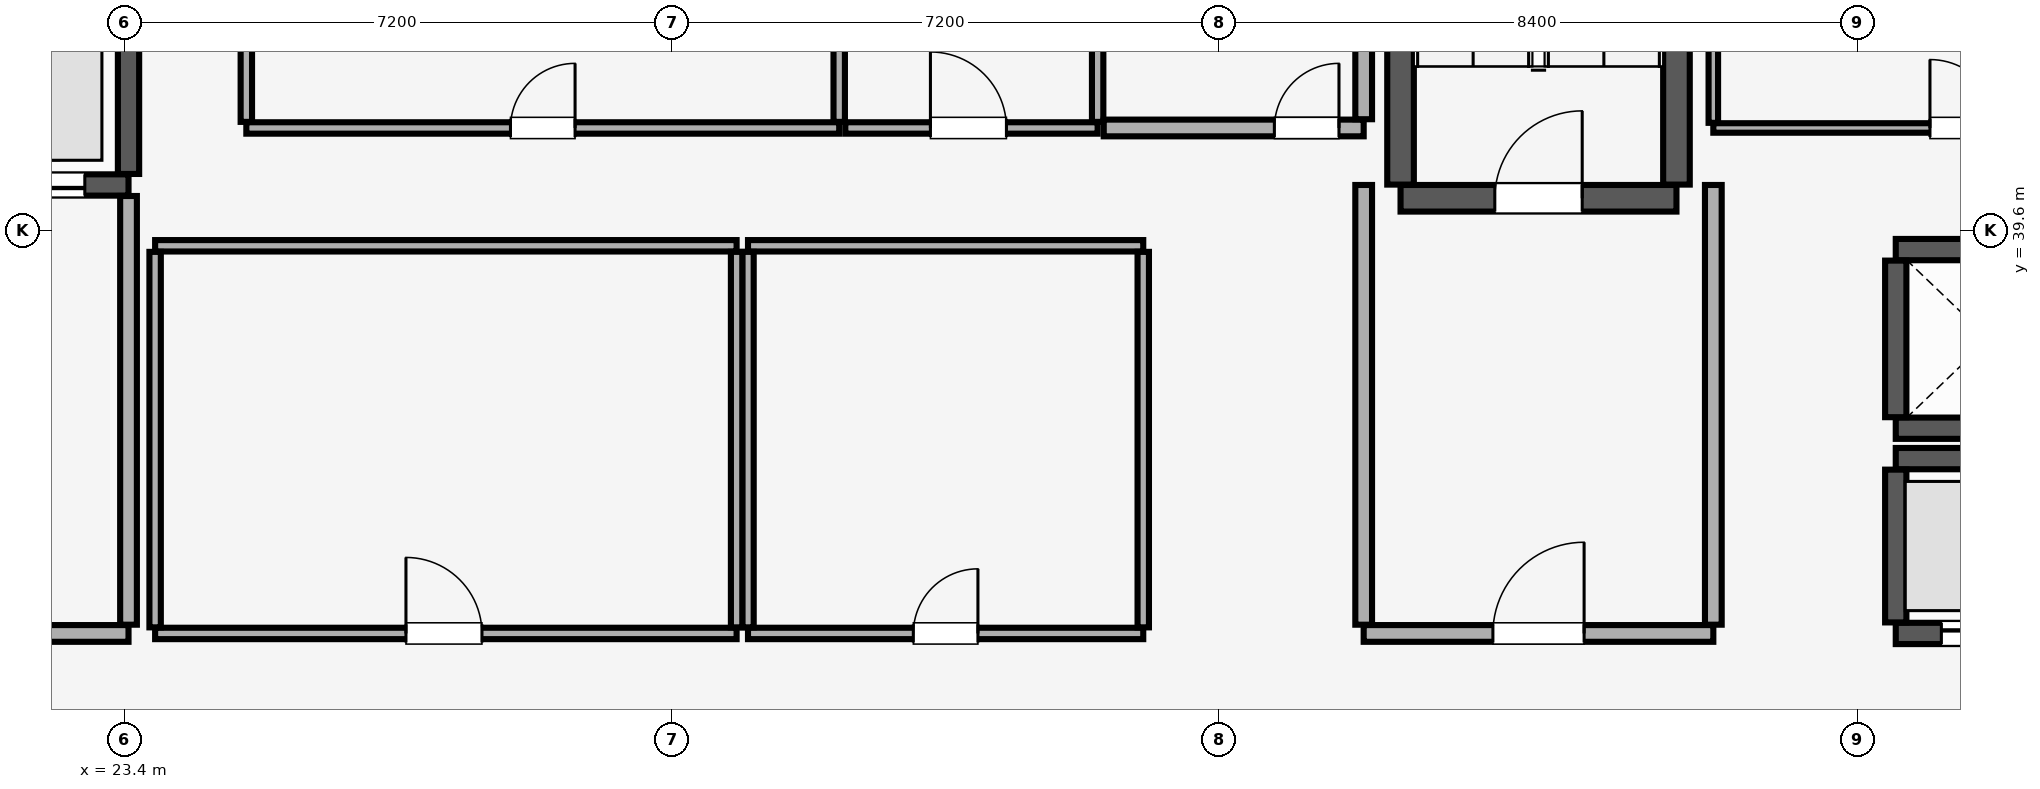
"""IFC4 building model, lengths in metres.
Left out: names, types, materials, properties, quantities, classifications, styles, units other than length and angle.
Written with IfcOpenShell. Run it as: python <this file> out.ifc"""

import sys

from ifc_helpers import new_model, si_unit, direction, frame, frame_2d, origin, place, context, subcontext, project, spatial, rectangle, extrude, element, fill, save


model = new_model("IFC4")
c1 = context("Model", 3, precision=1e-05, world=origin(), true_north=direction((0.0, 1.0)))
c2 = subcontext(c1, "Body", "Model", "MODEL_VIEW")
j1 = project(units=[si_unit("LENGTHUNIT", "METRE"), si_unit("PLANEANGLEUNIT", "RADIAN")], contexts=[c1])
p1 = place(None, origin())
s1 = spatial("IfcSite", under=j1, at=p1, CompositionType="ELEMENT")
p2 = place(p1, origin())
s2 = spatial("IfcBuilding", under=s1, at=p2, CompositionType="ELEMENT")
p3 = place(p2, frame((0.0, 0.0, 184.75)))
s3 = spatial("IfcBuildingStorey", under=s2, at=p3, CompositionType="ELEMENT", Elevation=184.75)
p4 = place(p3, frame((40.185, 40.025, 0.0), z_axis=(0.0, 0.0, 1.0), x_axis=(1.0, 0.0, 0.0)))
e1 = element("IfcWall", 1, at=p4, inside=s3, PredefinedType="SHEAR", context=c2, shape_type="SweptSolid", body=[
    extrude(rectangle(XDim=3.63, YDim=0.35, at=frame_2d((1.815, 0.0))), origin(), (0.0, 0.0, 1.0), 5.16),
])
p5 = place(p4, frame((1.24, 0.0, 0.0)))
e2 = element("IfcOpeningElement", 2, at=p5, cuts=e1, PredefinedType="OPENING", context=c2, shape_type="SweptSolid", body=[
    extrude(rectangle(XDim=1.15, YDim=2.15, at=frame_2d((0.575, 1.075))), frame((0.0, 0.185, 0.0), z_axis=(0.0, -1.0, 0.0), x_axis=(1.0, 0.0, 0.0)), (0.0, 0.0, 1.0), 0.37),
])
for number, where, z_axis, x_axis in (
    (3, (40.185, 40.205, 0.0), (0.0, 0.0, 1.0), (0.0, 1.0, 0.0)),
    (4, (43.815, 40.205, 0.0), (0.0, 0.0, 1.0), (0.0, 1.0, 0.0)),
):
    element("IfcWall", number, at=place(p3, frame(where, z_axis=z_axis, x_axis=x_axis)), inside=s3, PredefinedType="SHEAR", context=c2, shape_type="SweptSolid", body=[
        extrude(rectangle(XDim=8.09, YDim=0.35, at=frame_2d((4.045, 0.0))), origin(), (0.0, 0.0, 1.0), 5.16),
    ])
p6 = place(p3, frame((46.7, 34.3, 0.0), z_axis=(0.0, 0.0, 1.0), x_axis=(1.0, 0.0, 0.0)))
e5 = element("IfcWall", 5, at=p6, inside=s3, PredefinedType="SHEAR", context=c2, shape_type="SweptSolid", body=[
    extrude(rectangle(XDim=2.3, YDim=0.28, at=frame_2d((1.15, 0.0))), origin(), (0.0, 0.0, 1.0), 5.16),
])
p7 = place(p6, frame((0.6, 0.0, 0.0)))
e6 = element("IfcOpeningElement", 6, at=p7, cuts=e5, PredefinedType="OPENING", context=c2, shape_type="SweptSolid", body=[
    extrude(rectangle(XDim=1.1, YDim=2.2, at=frame_2d((0.55, 1.1))), frame((0.0, 0.15, 0.0), z_axis=(0.0, -1.0, 0.0), x_axis=(1.0, 0.0, 0.0)), (0.0, 0.0, 1.0), 0.3),
])
p8 = place(p3, frame((46.7, 36.6, 0.0), z_axis=(0.0, 0.0, 1.0), x_axis=(1.0, 0.0, 0.0)))
e7 = element("IfcWall", 7, at=p8, inside=s3, PredefinedType="SHEAR", context=c2, shape_type="SweptSolid", body=[
    extrude(rectangle(XDim=2.3, YDim=0.28, at=frame_2d((1.15, 0.0))), origin(), (0.0, 0.0, 1.0), 5.16),
])
p9 = place(p3, frame((46.7, 34.445, 0.0), z_axis=(0.0, 0.0, 1.0), x_axis=(0.0, 1.0, 0.0)))
e8 = element("IfcWall", 8, at=p9, inside=s3, PredefinedType="SHEAR", context=c2, shape_type="SweptSolid", body=[
    extrude(rectangle(XDim=2.01, YDim=0.28, at=frame_2d((1.005, 0.0))), origin(), (0.0, 0.0, 1.0), 5.16),
])
for number, where, z_axis, x_axis in (
    (9, (46.7, 37.0, 0.0), (0.0, 0.0, 1.0), (1.0, 0.0, 0.0)),
    (10, (46.7, 39.35, 0.0), (0.0, 0.0, 1.0), (1.0, 0.0, 0.0)),
):
    element("IfcWall", number, at=place(p3, frame(where, z_axis=z_axis, x_axis=x_axis)), inside=s3, PredefinedType="SHEAR", context=c2, shape_type="SweptSolid", body=[
        extrude(rectangle(XDim=2.45, YDim=0.28, at=frame_2d((1.225, 0.0))), origin(), (0.0, 0.0, 1.0), 5.16),
    ])
p10 = place(p3, frame((46.7, 37.145, 0.0), z_axis=(0.0, 0.0, 1.0), x_axis=(0.0, 1.0, 0.0)))
e11 = element("IfcWall", 11, at=p10, inside=s3, PredefinedType="SHEAR", context=c2, shape_type="SweptSolid", body=[
    extrude(rectangle(XDim=2.06, YDim=0.28, at=frame_2d((1.03, 0.0))), origin(), (0.0, 0.0, 1.0), 5.16),
])
p11 = place(p3, frame((21.035, 40.2, 0.0), z_axis=(0.0, 0.0, 1.0), x_axis=(1.0, 0.0, 0.0)))
e12 = element("IfcWall", 12, at=p11, inside=s3, PredefinedType="SHEAR", context=c2, shape_type="SweptSolid", body=[
    extrude(rectangle(XDim=2.415, YDim=0.28, at=frame_2d((1.208, 0.0))), origin(), (0.0, 0.0, 1.0), 5.16),
])
p12 = place(p11, frame((0.54, 0.0, 0.0)))
e13 = element("IfcOpeningElement", 13, at=p12, cuts=e12, PredefinedType="OPENING", context=c2, shape_type="SweptSolid", body=[
    extrude(rectangle(XDim=1.3, YDim=2.3, at=frame_2d((0.65, 1.15))), frame((0.0, 0.15, 0.0), z_axis=(0.0, -1.0, 0.0), x_axis=(1.0, 0.0, 0.0)), (0.0, 0.0, 1.0), 0.3),
])
p13 = place(p3, frame((23.45, 40.345, 0.0), z_axis=(0.0, 0.0, 1.0), x_axis=(0.0, 1.0, 0.0)))
e14 = element("IfcWall", 14, at=p13, inside=s3, PredefinedType="SHEAR", context=c2, shape_type="SweptSolid", body=[
    extrude(rectangle(XDim=2.81, YDim=0.28, at=frame_2d((1.405, 0.0))), origin(), (0.0, 0.0, 1.0), 5.16),
])
p14 = place(p3, frame((17.4, 34.3, 0.0), z_axis=(0.0, 0.0, 1.0), x_axis=(1.0, 0.0, 0.0)))
e15 = element("IfcWall", 15, at=p14, inside=s3, PredefinedType="PARTITIONING", context=c2, shape_type="SweptSolid", body=[
    extrude(rectangle(XDim=6.05, YDim=0.22, at=frame_2d((3.025, 0.0))), origin(), (0.0, 0.0, 1.0), 5.16),
])
p15 = place(p14, frame((2.2, 0.0, 0.0)))
e16 = element("IfcOpeningElement", 16, at=p15, cuts=e15, PredefinedType="OPENING", context=c2, shape_type="SweptSolid", body=[
    extrude(rectangle(XDim=1.2, YDim=2.15, at=frame_2d((0.6, 1.075))), frame((0.0, 0.12, 0.0), z_axis=(0.0, -1.0, 0.0), x_axis=(1.0, 0.0, 0.0)), (0.0, 0.0, 1.0), 0.24),
])
p16 = place(p3, frame((23.45, 34.415, 0.0), z_axis=(0.0, 0.0, 1.0), x_axis=(0.0, 1.0, 0.0)))
e17 = element("IfcWall", 17, at=p16, inside=s3, PredefinedType="PARTITIONING", context=c2, shape_type="SweptSolid", body=[
    extrude(rectangle(XDim=5.64, YDim=0.22, at=frame_2d((2.82, 0.0))), origin(), (0.0, 0.0, 1.0), 5.16),
])
p17 = place(p3, frame((39.7, 34.3, 0.0), z_axis=(0.0, 0.0, 1.0), x_axis=(1.0, 0.0, 0.0)))
e18 = element("IfcWall", 18, at=p17, inside=s3, PredefinedType="PARTITIONING", context=c2, shape_type="SweptSolid", body=[
    extrude(rectangle(XDim=4.6, YDim=0.22, at=frame_2d((2.3, 0.0))), origin(), (0.0, 0.0, 1.0), 5.16),
])
p18 = place(p17, frame((1.7, 0.0, 0.0)))
e19 = element("IfcOpeningElement", 19, at=p18, cuts=e18, PredefinedType="OPENING", context=c2, shape_type="SweptSolid", body=[
    extrude(rectangle(XDim=1.2, YDim=2.15, at=frame_2d((0.6, 1.075))), frame((0.0, 0.12, 0.0), z_axis=(0.0, -1.0, 0.0), x_axis=(1.0, 0.0, 0.0)), (0.0, 0.0, 1.0), 0.24),
])
for number, where, z_axis, x_axis in (
    (20, (39.7, 34.415, 0.0), (0.0, 0.0, 1.0), (0.0, 1.0, 0.0)),
    (21, (44.3, 34.415, 0.0), (0.0, 0.0, 1.0), (0.0, 1.0, 0.0)),
):
    element("IfcWall", number, at=place(p3, frame(where, z_axis=z_axis, x_axis=x_axis)), inside=s3, PredefinedType="PARTITIONING", context=c2, shape_type="SweptSolid", body=[
        extrude(rectangle(XDim=5.785, YDim=0.22, at=frame_2d((2.893, 0.0))), origin(), (0.0, 0.0, 1.0), 5.16),
    ])
p19 = place(p3, frame((31.6, 34.3, 0.0), z_axis=(0.0, 0.0, 1.0), x_axis=(1.0, 0.0, 0.0)))
e22 = element("IfcWall", 22, at=p19, inside=s3, PredefinedType="PARTITIONING", context=c2, shape_type="SweptSolid", body=[
    extrude(rectangle(XDim=5.2, YDim=0.15, at=frame_2d((2.6, 0.0))), origin(), (0.0, 0.0, 1.0), 5.16),
])
p20 = place(p19, frame((2.175, 0.0, 0.0)))
e23 = element("IfcOpeningElement", 23, at=p20, cuts=e22, PredefinedType="OPENING", context=c2, shape_type="SweptSolid", body=[
    extrude(rectangle(XDim=0.85, YDim=2.1, at=frame_2d((0.425, 1.05))), frame((0.0, 0.085, 0.0), z_axis=(0.0, -1.0, 0.0), x_axis=(1.0, 0.0, 0.0)), (0.0, 0.0, 1.0), 0.17),
])
p21 = place(p3, frame((31.6, 39.4, 0.0), z_axis=(0.0, 0.0, 1.0), x_axis=(1.0, 0.0, 0.0)))
e24 = element("IfcWall", 24, at=p21, inside=s3, PredefinedType="PARTITIONING", context=c2, shape_type="SweptSolid", body=[
    extrude(rectangle(XDim=5.2, YDim=0.15, at=frame_2d((2.6, 0.0))), origin(), (0.0, 0.0, 1.0), 5.16),
])
for number, where, z_axis, x_axis in (
    (25, (31.6, 34.38, 0.0), (0.0, 0.0, 1.0), (0.0, 1.0, 0.0)),
    (26, (36.8, 34.38, 0.0), (0.0, 0.0, 1.0), (0.0, 1.0, 0.0)),
):
    element("IfcWall", number, at=place(p3, frame(where, z_axis=z_axis, x_axis=x_axis)), inside=s3, PredefinedType="PARTITIONING", context=c2, shape_type="SweptSolid", body=[
        extrude(rectangle(XDim=4.94, YDim=0.15, at=frame_2d((2.47, 0.0))), origin(), (0.0, 0.0, 1.0), 5.16),
    ])
p22 = place(p3, frame((23.8, 34.3, 0.0), z_axis=(0.0, 0.0, 1.0), x_axis=(1.0, 0.0, 0.0)))
e27 = element("IfcWall", 27, at=p22, inside=s3, PredefinedType="PARTITIONING", context=c2, shape_type="SweptSolid", body=[
    extrude(rectangle(XDim=7.65, YDim=0.15, at=frame_2d((3.825, 0.0))), origin(), (0.0, 0.0, 1.0), 5.16),
])
p23 = place(p22, frame((3.3, 0.0, 0.0)))
e28 = element("IfcOpeningElement", 28, at=p23, cuts=e27, PredefinedType="OPENING", context=c2, shape_type="SweptSolid", body=[
    extrude(rectangle(XDim=1.0, YDim=2.15, at=frame_2d((0.5, 1.075))), frame((0.0, 0.085, 0.0), z_axis=(0.0, -1.0, 0.0), x_axis=(1.0, 0.0, 0.0)), (0.0, 0.0, 1.0), 0.17),
])
p24 = place(p3, frame((23.8, 39.4, 0.0), z_axis=(0.0, 0.0, 1.0), x_axis=(1.0, 0.0, 0.0)))
e29 = element("IfcWall", 29, at=p24, inside=s3, PredefinedType="PARTITIONING", context=c2, shape_type="SweptSolid", body=[
    extrude(rectangle(XDim=7.65, YDim=0.15, at=frame_2d((3.825, 0.0))), origin(), (0.0, 0.0, 1.0), 5.16),
])
for number, where, z_axis, x_axis in (
    (30, (23.8, 34.38, 0.0), (0.0, 0.0, 1.0), (0.0, 1.0, 0.0)),
    (31, (31.45, 34.38, 0.0), (0.0, 0.0, 1.0), (0.0, 1.0, 0.0)),
):
    element("IfcWall", number, at=place(p3, frame(where, z_axis=z_axis, x_axis=x_axis)), inside=s3, PredefinedType="PARTITIONING", context=c2, shape_type="SweptSolid", body=[
        extrude(rectangle(XDim=4.94, YDim=0.15, at=frame_2d((2.47, 0.0))), origin(), (0.0, 0.0, 1.0), 5.16),
    ])
p25 = place(p3, frame((25.0, 40.95, 0.0), z_axis=(0.0, 0.0, 1.0), x_axis=(1.0, 0.0, 0.0)))
e32 = element("IfcWall", 32, at=p25, inside=s3, PredefinedType="PARTITIONING", context=c2, shape_type="SweptSolid", body=[
    extrude(rectangle(XDim=7.8, YDim=0.15, at=frame_2d((3.9, 0.0))), origin(), (0.0, 0.0, 1.0), 5.16),
])
p26 = place(p25, frame((3.475, 0.0, 0.0)))
e33 = element("IfcOpeningElement", 33, at=p26, cuts=e32, PredefinedType="OPENING", context=c2, shape_type="SweptSolid", body=[
    extrude(rectangle(XDim=0.85, YDim=2.1, at=frame_2d((0.425, 1.05))), frame((0.0, 0.085, 0.0), z_axis=(0.0, -1.0, 0.0), x_axis=(1.0, 0.0, 0.0)), (0.0, 0.0, 1.0), 0.17),
])
for number, where, z_axis, x_axis in (
    (34, (25.0, 41.03, 0.0), (0.0, 0.0, 1.0), (0.0, 1.0, 0.0)),
    (35, (32.8, 41.03, 0.0), (0.0, 0.0, 1.0), (0.0, 1.0, 0.0)),
):
    element("IfcWall", number, at=place(p3, frame(where, z_axis=z_axis, x_axis=x_axis)), inside=s3, PredefinedType="PARTITIONING", context=c2, shape_type="SweptSolid", body=[
        extrude(rectangle(XDim=7.82, YDim=0.15, at=frame_2d((3.91, 0.0))), origin(), (0.0, 0.0, 1.0), 5.16),
    ])
p27 = place(p3, frame((32.88, 40.95, 0.0), z_axis=(0.0, 0.0, 1.0), x_axis=(1.0, 0.0, 0.0)))
e36 = element("IfcWall", 36, at=p27, inside=s3, PredefinedType="PARTITIONING", context=c2, shape_type="SweptSolid", body=[
    extrude(rectangle(XDim=3.32, YDim=0.15, at=frame_2d((1.66, 0.0))), origin(), (0.0, 0.0, 1.0), 5.16),
])
p28 = place(p27, frame((1.12, 0.0, 0.0)))
e37 = element("IfcOpeningElement", 37, at=p28, cuts=e36, PredefinedType="OPENING", context=c2, shape_type="SweptSolid", body=[
    extrude(rectangle(XDim=1.0, YDim=2.15, at=frame_2d((0.5, 1.075))), frame((0.0, 0.085, 0.0), z_axis=(0.0, -1.0, 0.0), x_axis=(1.0, 0.0, 0.0)), (0.0, 0.0, 1.0), 0.17),
])
p29 = place(p3, frame((36.2, 41.03, 0.0), z_axis=(0.0, 0.0, 1.0), x_axis=(0.0, 1.0, 0.0)))
e38 = element("IfcWall", 38, at=p29, inside=s3, PredefinedType="PARTITIONING", context=c2, shape_type="SweptSolid", body=[
    extrude(rectangle(XDim=7.82, YDim=0.15, at=frame_2d((3.91, 0.0))), origin(), (0.0, 0.0, 1.0), 5.16),
])
p30 = place(p3, frame((36.28, 40.95, 0.0), z_axis=(0.0, 0.0, 1.0), x_axis=(1.0, 0.0, 0.0)))
e39 = element("IfcWall", 39, at=p30, inside=s3, PredefinedType="PARTITIONING", context=c2, shape_type="SweptSolid", body=[
    extrude(rectangle(XDim=3.42, YDim=0.22, at=frame_2d((1.71, 0.0))), origin(), (0.0, 0.0, 1.0), 5.16),
])
p31 = place(p30, frame((2.245, 0.0, 0.0)))
e40 = element("IfcOpeningElement", 40, at=p31, cuts=e39, PredefinedType="OPENING", context=c2, shape_type="SweptSolid", body=[
    extrude(rectangle(XDim=0.85, YDim=2.1, at=frame_2d((0.425, 1.05))), frame((0.0, 0.12, 0.0), z_axis=(0.0, -1.0, 0.0), x_axis=(1.0, 0.0, 0.0)), (0.0, 0.0, 1.0), 0.24),
])
p32 = place(p3, frame((39.7, 41.065, 0.0), z_axis=(0.0, 0.0, 1.0), x_axis=(0.0, 1.0, 0.0)))
e41 = element("IfcWall", 41, at=p32, inside=s3, PredefinedType="PARTITIONING", context=c2, shape_type="SweptSolid", body=[
    extrude(rectangle(XDim=7.785, YDim=0.22, at=frame_2d((3.893, 0.0))), origin(), (0.0, 0.0, 1.0), 5.16),
])
p33 = place(p3, frame((44.3, 40.95, 0.0), z_axis=(0.0, 0.0, 1.0), x_axis=(1.0, 0.0, 0.0)))
e42 = element("IfcWall", 42, at=p33, inside=s3, PredefinedType="PARTITIONING", context=c2, shape_type="SweptSolid", body=[
    extrude(rectangle(XDim=4.6, YDim=0.125, at=frame_2d((2.3, 0.0))), origin(), (0.0, 0.0, 1.0), 5.16),
])
p34 = place(p33, frame((2.85, 0.0, 0.0)))
e43 = element("IfcOpeningElement", 43, at=p34, cuts=e42, PredefinedType="OPENING", context=c2, shape_type="SweptSolid", body=[
    extrude(rectangle(XDim=0.9, YDim=2.1, at=frame_2d((0.45, 1.05))), frame((0.0, 0.073, 0.0), z_axis=(0.0, -1.0, 0.0), x_axis=(1.0, 0.0, 0.0)), (0.0, 0.0, 1.0), 0.145),
])
p35 = place(p3, frame((44.3, 41.018, 0.0), z_axis=(0.0, 0.0, 1.0), x_axis=(0.0, 1.0, 0.0)))
e44 = element("IfcWall", 44, at=p35, inside=s3, PredefinedType="PARTITIONING", context=c2, shape_type="SweptSolid", body=[
    extrude(rectangle(XDim=3.515, YDim=0.125, at=frame_2d((1.757, 0.0))), origin(), (0.0, 0.0, 1.0), 5.16),
])
p36 = place(p5, origin())
e45 = element("IfcDoor", 45, at=p36, inside=s3, OperationType="SINGLE_SWING_RIGHT", PredefinedType="DOOR", context=c2, shape_type="SweptSolid", body=[
    extrude(rectangle(XDim=1.15, YDim=2.15, at=frame_2d((0.575, 1.075))), frame((0.0, 0.025, 0.0), z_axis=(0.0, -1.0, 0.0), x_axis=(1.0, 0.0, 0.0)), (0.0, 0.0, 1.0), 0.05),
])
fill(e2, e45)
p37 = place(p7, origin())
e46 = element("IfcDoor", 46, at=p37, inside=s3, OperationType="DOUBLE_DOOR_SLIDING", PredefinedType="DOOR", context=c2, shape_type="SweptSolid", body=[
    extrude(rectangle(XDim=1.1, YDim=2.2, at=frame_2d((0.55, 1.1))), frame((0.0, 0.025, 0.0), z_axis=(0.0, -1.0, 0.0), x_axis=(1.0, 0.0, 0.0)), (0.0, 0.0, 1.0), 0.05),
])
fill(e6, e46)
p38 = place(p12, origin())
e47 = element("IfcDoor", 47, at=p38, inside=s3, OperationType="DOUBLE_DOOR_SLIDING", PredefinedType="DOOR", context=c2, shape_type="SweptSolid", body=[
    extrude(rectangle(XDim=1.3, YDim=2.3, at=frame_2d((0.65, 1.15))), frame((0.0, 0.025, 0.0), z_axis=(0.0, -1.0, 0.0), x_axis=(1.0, 0.0, 0.0)), (0.0, 0.0, 1.0), 0.05),
])
fill(e13, e47)
p39 = place(p18, origin())
e48 = element("IfcDoor", 48, at=p39, inside=s3, OperationType="SINGLE_SWING_RIGHT", PredefinedType="DOOR", context=c2, shape_type="SweptSolid", body=[
    extrude(rectangle(XDim=1.2, YDim=2.15, at=frame_2d((0.6, 1.075))), frame((0.0, 0.025, 0.0), z_axis=(0.0, -1.0, 0.0), x_axis=(1.0, 0.0, 0.0)), (0.0, 0.0, 1.0), 0.05),
])
fill(e19, e48)
p40 = place(p20, origin())
e49 = element("IfcDoor", 49, at=p40, inside=s3, OperationType="SINGLE_SWING_RIGHT", PredefinedType="DOOR", context=c2, shape_type="SweptSolid", body=[
    extrude(rectangle(XDim=0.85, YDim=2.1, at=frame_2d((0.425, 1.05))), frame((0.0, 0.025, 0.0), z_axis=(0.0, -1.0, 0.0), x_axis=(1.0, 0.0, 0.0)), (0.0, 0.0, 1.0), 0.05),
])
fill(e23, e49)
p41 = place(p23, origin())
e50 = element("IfcDoor", 50, at=p41, inside=s3, OperationType="SINGLE_SWING_LEFT", PredefinedType="DOOR", context=c2, shape_type="SweptSolid", body=[
    extrude(rectangle(XDim=1.0, YDim=2.15, at=frame_2d((0.5, 1.075))), frame((0.0, 0.025, 0.0), z_axis=(0.0, -1.0, 0.0), x_axis=(1.0, 0.0, 0.0)), (0.0, 0.0, 1.0), 0.05),
])
fill(e28, e50)
p42 = place(p26, origin())
e51 = element("IfcDoor", 51, at=p42, inside=s3, OperationType="SINGLE_SWING_RIGHT", PredefinedType="DOOR", context=c2, shape_type="SweptSolid", body=[
    extrude(rectangle(XDim=0.85, YDim=2.1, at=frame_2d((0.425, 1.05))), frame((0.0, 0.025, 0.0), z_axis=(0.0, -1.0, 0.0), x_axis=(1.0, 0.0, 0.0)), (0.0, 0.0, 1.0), 0.05),
])
fill(e33, e51)
p43 = place(p28, origin())
e52 = element("IfcDoor", 52, at=p43, inside=s3, OperationType="SINGLE_SWING_LEFT", PredefinedType="DOOR", context=c2, shape_type="SweptSolid", body=[
    extrude(rectangle(XDim=1.0, YDim=2.15, at=frame_2d((0.5, 1.075))), frame((0.0, 0.025, 0.0), z_axis=(0.0, -1.0, 0.0), x_axis=(1.0, 0.0, 0.0)), (0.0, 0.0, 1.0), 0.05),
])
fill(e37, e52)
p44 = place(p31, origin())
e53 = element("IfcDoor", 53, at=p44, inside=s3, OperationType="SINGLE_SWING_RIGHT", PredefinedType="DOOR", context=c2, shape_type="SweptSolid", body=[
    extrude(rectangle(XDim=0.85, YDim=2.1, at=frame_2d((0.425, 1.05))), frame((0.0, 0.025, 0.0), z_axis=(0.0, -1.0, 0.0), x_axis=(1.0, 0.0, 0.0)), (0.0, 0.0, 1.0), 0.05),
])
fill(e40, e53)
p45 = place(p34, origin())
e54 = element("IfcDoor", 54, at=p45, inside=s3, OperationType="SINGLE_SWING_LEFT", PredefinedType="DOOR", context=c2, shape_type="SweptSolid", body=[
    extrude(rectangle(XDim=0.9, YDim=2.1, at=frame_2d((0.45, 1.05))), frame((0.0, 0.025, 0.0), z_axis=(0.0, -1.0, 0.0), x_axis=(1.0, 0.0, 0.0)), (0.0, 0.0, 1.0), 0.05),
])
fill(e43, e54)
save(model, sys.argv[1])
